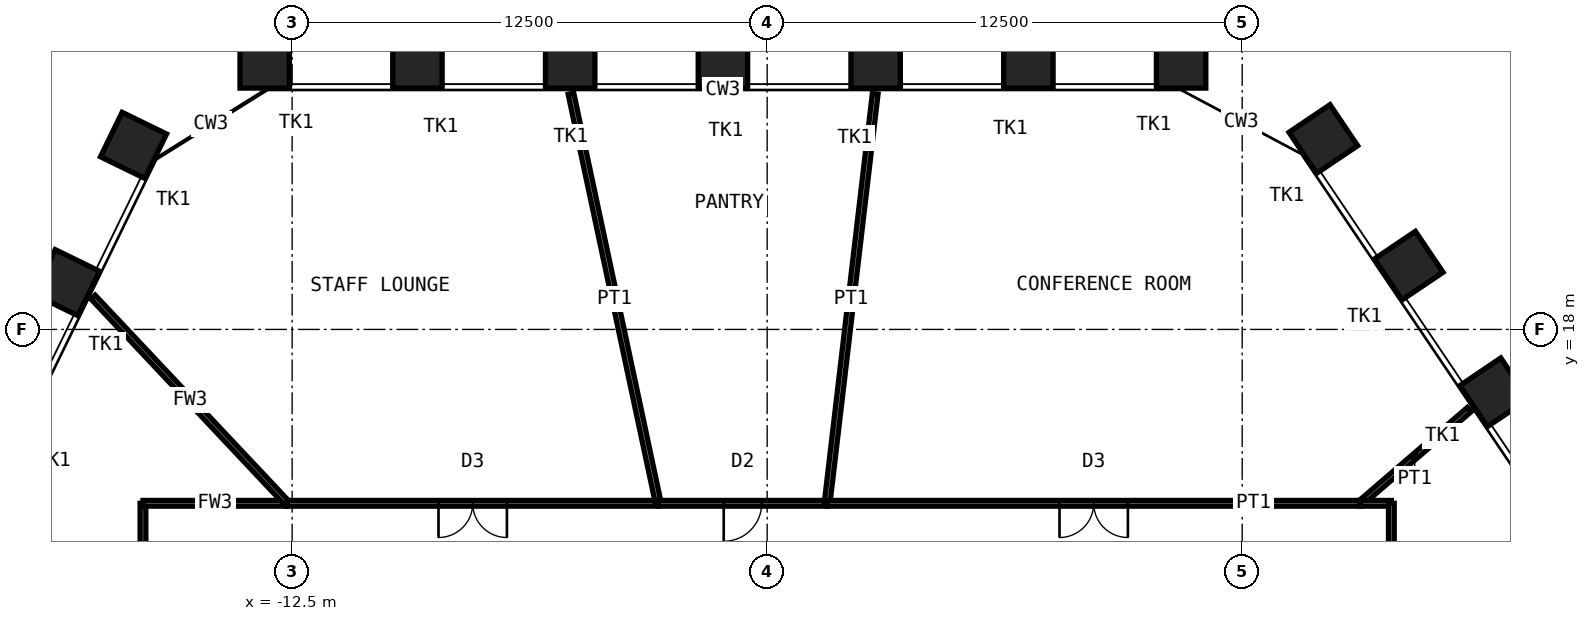
"""IFC4 building model, lengths in metres.
Left out: names, types, materials, properties, quantities, classifications, styles, units other than length and angle.
Written with IfcOpenShell. Run it as: python <this file> out.ifc"""

import sys

from ifc_helpers import new_model, si_unit, direction, frame, frame_2d, origin, origin_2d, place, context, subcontext, project, spatial, rectangle, hollow_rectangle, extrude, element, fill, save


model = new_model("IFC4")
c1 = context("Model", 3, precision=1e-05, world=origin(), true_north=direction((0.0, 1.0)))
c2 = subcontext(c1, "Body", "Model", "MODEL_VIEW")
j1 = project(units=[si_unit("LENGTHUNIT", "METRE"), si_unit("PLANEANGLEUNIT", "RADIAN")], contexts=[c1])
p1 = place(None, origin())
s1 = spatial("IfcSite", under=j1, at=p1, CompositionType="ELEMENT")
p2 = place(p1, origin())
s2 = spatial("IfcBuilding", under=s1, at=p2, CompositionType="ELEMENT")
p3 = place(p2, frame((0.0, 0.0, 103.0)))
s3 = spatial("IfcBuildingStorey", under=s2, at=p3, CompositionType="ELEMENT", Elevation=103.0)
for number, where, z_axis, x_axis in (
    (1, (-13.222, 25.0, 0.0), (0.0, 0.0, 1.0), (-1.0, 0.0, 0.0)),
    (2, (-9.203, 25.0, 0.0), (0.0, 0.0, 1.0), (-1.0, 0.0, 0.0)),
    (3, (-5.184, 25.0, 0.0), (0.0, 0.0, 1.0), (-1.0, 0.0, 0.0)),
    (4, (-1.165, 25.0, 0.0), (0.0, 0.0, 1.0), (-1.0, 0.0, 0.0)),
    (5, (2.854, 25.0, 0.0), (0.0, 0.0, 1.0), (-1.0, 0.0, 0.0)),
    (6, (6.874, 25.0, 0.0), (0.0, 0.0, 1.0), (-1.0, 0.0, 0.0)),
    (7, (10.893, 25.0, 0.0), (0.0, 0.0, 1.0), (-1.0, 0.0, 0.0)),
    (8, (14.635, 23.01, 0.0), (0.0, 0.0, 1.0), (-0.559, 0.829, 0.0)),
    (9, (16.882, 19.678, 0.0), (0.0, 0.0, 1.0), (-0.559, 0.829, 0.0)),
    (10, (19.13, 16.346, 0.0), (0.0, 0.0, 1.0), (-0.559, 0.829, 0.0)),
    (11, (-18.436, 19.23, 0.0), (0.0, 0.0, 1.0), (-0.438, -0.899, 0.0)),
    (12, (-16.674, 22.843, 0.0), (0.0, 0.0, 1.0), (-0.438, -0.899, 0.0)),
):
    element("IfcColumn", number, at=place(p3, frame(where, z_axis=z_axis, x_axis=x_axis)), inside=s3, PredefinedType="COLUMN", context=c2, shape_type="SweptSolid", body=[
        extrude(hollow_rectangle(XDim=1.3, YDim=1.3, WallThickness=0.1, at=origin_2d()), origin(), (0.0, 0.0, 1.0), 4.2),
    ])
p4 = place(p3, frame((-16.425, 5.752, 0.0), z_axis=(0.0, 0.0, 1.0), x_axis=(0.0, 1.0, 0.0)))
e13 = element("IfcWall", 13, at=p4, inside=s3, PredefinedType="PARTITIONING", context=c2, shape_type="SweptSolid", body=[
    extrude(rectangle(XDim=7.673, YDim=0.15, at=frame_2d((3.836, 0.0))), origin(), (0.0, 0.0, 1.0), 4.03),
])
p5 = place(p4, frame((2.937, 0.0, 0.0)))
e14 = element("IfcOpeningElement", 14, at=p5, cuts=e13, PredefinedType="OPENING", context=c2, shape_type="SweptSolid", body=[
    extrude(rectangle(XDim=1.8, YDim=2.1, at=frame_2d((0.9, 1.05))), frame((0.0, 0.085, 0.0), z_axis=(0.0, -1.0, 0.0), x_axis=(1.0, 0.0, 0.0)), (0.0, 0.0, 1.0), 0.17),
])
p6 = place(p3, frame((-16.425, 13.425, 0.0), z_axis=(0.0, 0.0, 1.0), x_axis=(1.0, 0.0, 0.0)))
e15 = element("IfcWall", 15, at=p6, inside=s3, PredefinedType="PARTITIONING", context=c2, shape_type="SweptSolid", body=[
    extrude(rectangle(XDim=3.793, YDim=0.15, at=frame_2d((1.896, 0.0))), origin(), (0.0, 0.0, 1.0), 4.03),
])
p7 = place(p3, frame((-17.738, 18.851, 0.0), z_axis=(0.0, 0.0, 1.0), x_axis=(0.685300300524, -0.728260597659, 0.0)))
e16 = element("IfcWall", 16, at=p7, inside=s3, PredefinedType="PARTITIONING", context=c2, shape_type="SweptSolid", body=[
    extrude(rectangle(XDim=7.45, YDim=0.15, at=frame_2d((3.725, 0.0))), origin(), (0.0, 0.0, 1.0), 2.93),
])
p8 = place(p3, frame((-12.632, 13.425, 0.0), z_axis=(0.0, 0.0, 1.0), x_axis=(1.0, 0.0, 0.0)))
e17 = element("IfcWall", 17, at=p8, inside=s3, PredefinedType="PARTITIONING", context=c2, shape_type="SweptSolid", body=[
    extrude(rectangle(XDim=9.769, YDim=0.15, at=frame_2d((4.884, 0.0))), origin(), (0.0, 0.0, 1.0), 4.03),
])
p9 = place(p8, frame((3.984, 0.0, 0.0)))
e18 = element("IfcOpeningElement", 18, at=p9, cuts=e17, PredefinedType="OPENING", context=c2, shape_type="SweptSolid", body=[
    extrude(rectangle(XDim=1.8, YDim=2.4, at=frame_2d((0.9, 1.2))), frame((0.0, 0.085, 0.0), z_axis=(0.0, -1.0, 0.0), x_axis=(1.0, 0.0, 0.0)), (0.0, 0.0, 1.0), 0.17),
])
p10 = place(p3, frame((-5.163, 24.202, 0.0), z_axis=(0.0, 0.0, 1.0), x_axis=(0.208613607821, -0.977998140403, 0.0)))
e19 = element("IfcWall", 19, at=p10, inside=s3, PredefinedType="PARTITIONING", context=c2, shape_type="SweptSolid", body=[
    extrude(rectangle(XDim=11.02, YDim=0.15, at=frame_2d((5.51, 0.0))), origin(), (0.0, 0.0, 1.0), 2.93),
])
p11 = place(p3, frame((-2.864, 13.425, 0.0), z_axis=(0.0, 0.0, 1.0), x_axis=(1.0, 0.0, 0.0)))
e20 = element("IfcWall", 20, at=p11, inside=s3, PredefinedType="PARTITIONING", context=c2, shape_type="SweptSolid", body=[
    extrude(rectangle(XDim=4.441, YDim=0.15, at=frame_2d((2.22, 0.0))), origin(), (0.0, 0.0, 1.0), 4.03),
])
p12 = place(p11, frame((1.72, 0.0, 0.0)))
e21 = element("IfcOpeningElement", 21, at=p12, cuts=e20, PredefinedType="OPENING", context=c2, shape_type="SweptSolid", body=[
    extrude(rectangle(XDim=1.0, YDim=2.4, at=frame_2d((0.5, 1.2))), frame((0.0, 0.085, 0.0), z_axis=(0.0, -1.0, 0.0), x_axis=(1.0, 0.0, 0.0)), (0.0, 0.0, 1.0), 0.17),
])
p13 = place(p3, frame((2.843, 24.201, 0.0), z_axis=(0.0, 0.0, 1.0), x_axis=(-0.116672826544, -0.993170404083, 0.0)))
e22 = element("IfcWall", 22, at=p13, inside=s3, PredefinedType="PARTITIONING", context=c2, shape_type="SweptSolid", body=[
    extrude(rectangle(XDim=10.85, YDim=0.15, at=frame_2d((5.425, 0.0))), origin(), (0.0, 0.0, 1.0), 2.93),
])
p14 = place(p3, frame((1.577, 13.425, 0.0), z_axis=(0.0, 0.0, 1.0), x_axis=(1.0, 0.0, 0.0)))
e23 = element("IfcWall", 23, at=p14, inside=s3, PredefinedType="PARTITIONING", context=c2, shape_type="SweptSolid", body=[
    extrude(rectangle(XDim=14.031, YDim=0.15, at=frame_2d((7.015, 0.0))), origin(), (0.0, 0.0, 1.0), 4.03),
])
p15 = place(p14, frame((6.115, 0.0, 0.0)))
e24 = element("IfcOpeningElement", 24, at=p15, cuts=e23, PredefinedType="OPENING", context=c2, shape_type="SweptSolid", body=[
    extrude(rectangle(XDim=1.8, YDim=2.4, at=frame_2d((0.9, 1.2))), frame((0.0, 0.085, 0.0), z_axis=(0.0, -1.0, 0.0), x_axis=(1.0, 0.0, 0.0)), (0.0, 0.0, 1.0), 0.17),
])
p16 = place(p3, frame((18.474, 15.89, 0.0), z_axis=(0.0, 0.0, 1.0), x_axis=(-0.758174978019, -0.652051150375, 0.0)))
e25 = element("IfcWall", 25, at=p16, inside=s3, PredefinedType="PARTITIONING", context=c2, shape_type="SweptSolid", body=[
    extrude(rectangle(XDim=3.78, YDim=0.15, at=frame_2d((1.89, 0.0))), origin(), (0.0, 0.0, 1.0), 2.93),
])
p17 = place(p3, frame((15.608, 13.425, 0.0), z_axis=(0.0, 0.0, 1.0), x_axis=(1.0, 0.0, 0.0)))
e26 = element("IfcWall", 26, at=p17, inside=s3, PredefinedType="PARTITIONING", context=c2, shape_type="SweptSolid", body=[
    extrude(rectangle(XDim=0.817, YDim=0.15, at=frame_2d((0.409, 0.0))), origin(), (0.0, 0.0, 1.0), 4.03),
])
p18 = place(p3, frame((16.425, 13.425, 0.0), z_axis=(0.0, 0.0, 1.0), x_axis=(0.0, -1.0, 0.0)))
e27 = element("IfcWall", 27, at=p18, inside=s3, PredefinedType="PARTITIONING", context=c2, shape_type="SweptSolid", body=[
    extrude(rectangle(XDim=9.555, YDim=0.15, at=frame_2d((4.778, 0.0))), origin(), (0.0, 0.0, 1.0), 4.03),
])
p19 = place(p18, frame((3.877, 0.0, 0.0)))
e28 = element("IfcOpeningElement", 28, at=p19, cuts=e27, PredefinedType="OPENING", context=c2, shape_type="SweptSolid", body=[
    extrude(rectangle(XDim=1.8, YDim=2.4, at=frame_2d((0.9, 1.2))), frame((0.0, 0.085, 0.0), z_axis=(0.0, -1.0, 0.0), x_axis=(1.0, 0.0, 0.0)), (0.0, 0.0, 1.0), 0.17),
])
p20 = place(p9, origin())
e29 = element("IfcDoor", 29, at=p20, inside=s3, OperationType="DOUBLE_DOOR_DOUBLE_SWING", PredefinedType="DOOR", context=c2, shape_type="SweptSolid", body=[
    extrude(rectangle(XDim=1.8, YDim=2.4, at=frame_2d((0.9, 1.2))), frame((0.0, 0.025, 0.0), z_axis=(0.0, -1.0, 0.0), x_axis=(1.0, 0.0, 0.0)), (0.0, 0.0, 1.0), 0.05),
])
fill(e18, e29)
p21 = place(p12, origin())
e30 = element("IfcDoor", 30, at=p21, inside=s3, OperationType="SINGLE_SWING_LEFT", PredefinedType="DOOR", context=c2, shape_type="SweptSolid", body=[
    extrude(rectangle(XDim=1.0, YDim=2.4, at=frame_2d((0.5, 1.2))), frame((0.0, 0.025, 0.0), z_axis=(0.0, -1.0, 0.0), x_axis=(1.0, 0.0, 0.0)), (0.0, 0.0, 1.0), 0.05),
])
fill(e21, e30)
p22 = place(p15, origin())
e31 = element("IfcDoor", 31, at=p22, inside=s3, OperationType="DOUBLE_DOOR_DOUBLE_SWING", PredefinedType="DOOR", context=c2, shape_type="SweptSolid", body=[
    extrude(rectangle(XDim=1.8, YDim=2.4, at=frame_2d((0.9, 1.2))), frame((0.0, 0.025, 0.0), z_axis=(0.0, -1.0, 0.0), x_axis=(1.0, 0.0, 0.0)), (0.0, 0.0, 1.0), 0.05),
])
fill(e24, e31)
save(model, sys.argv[1])
